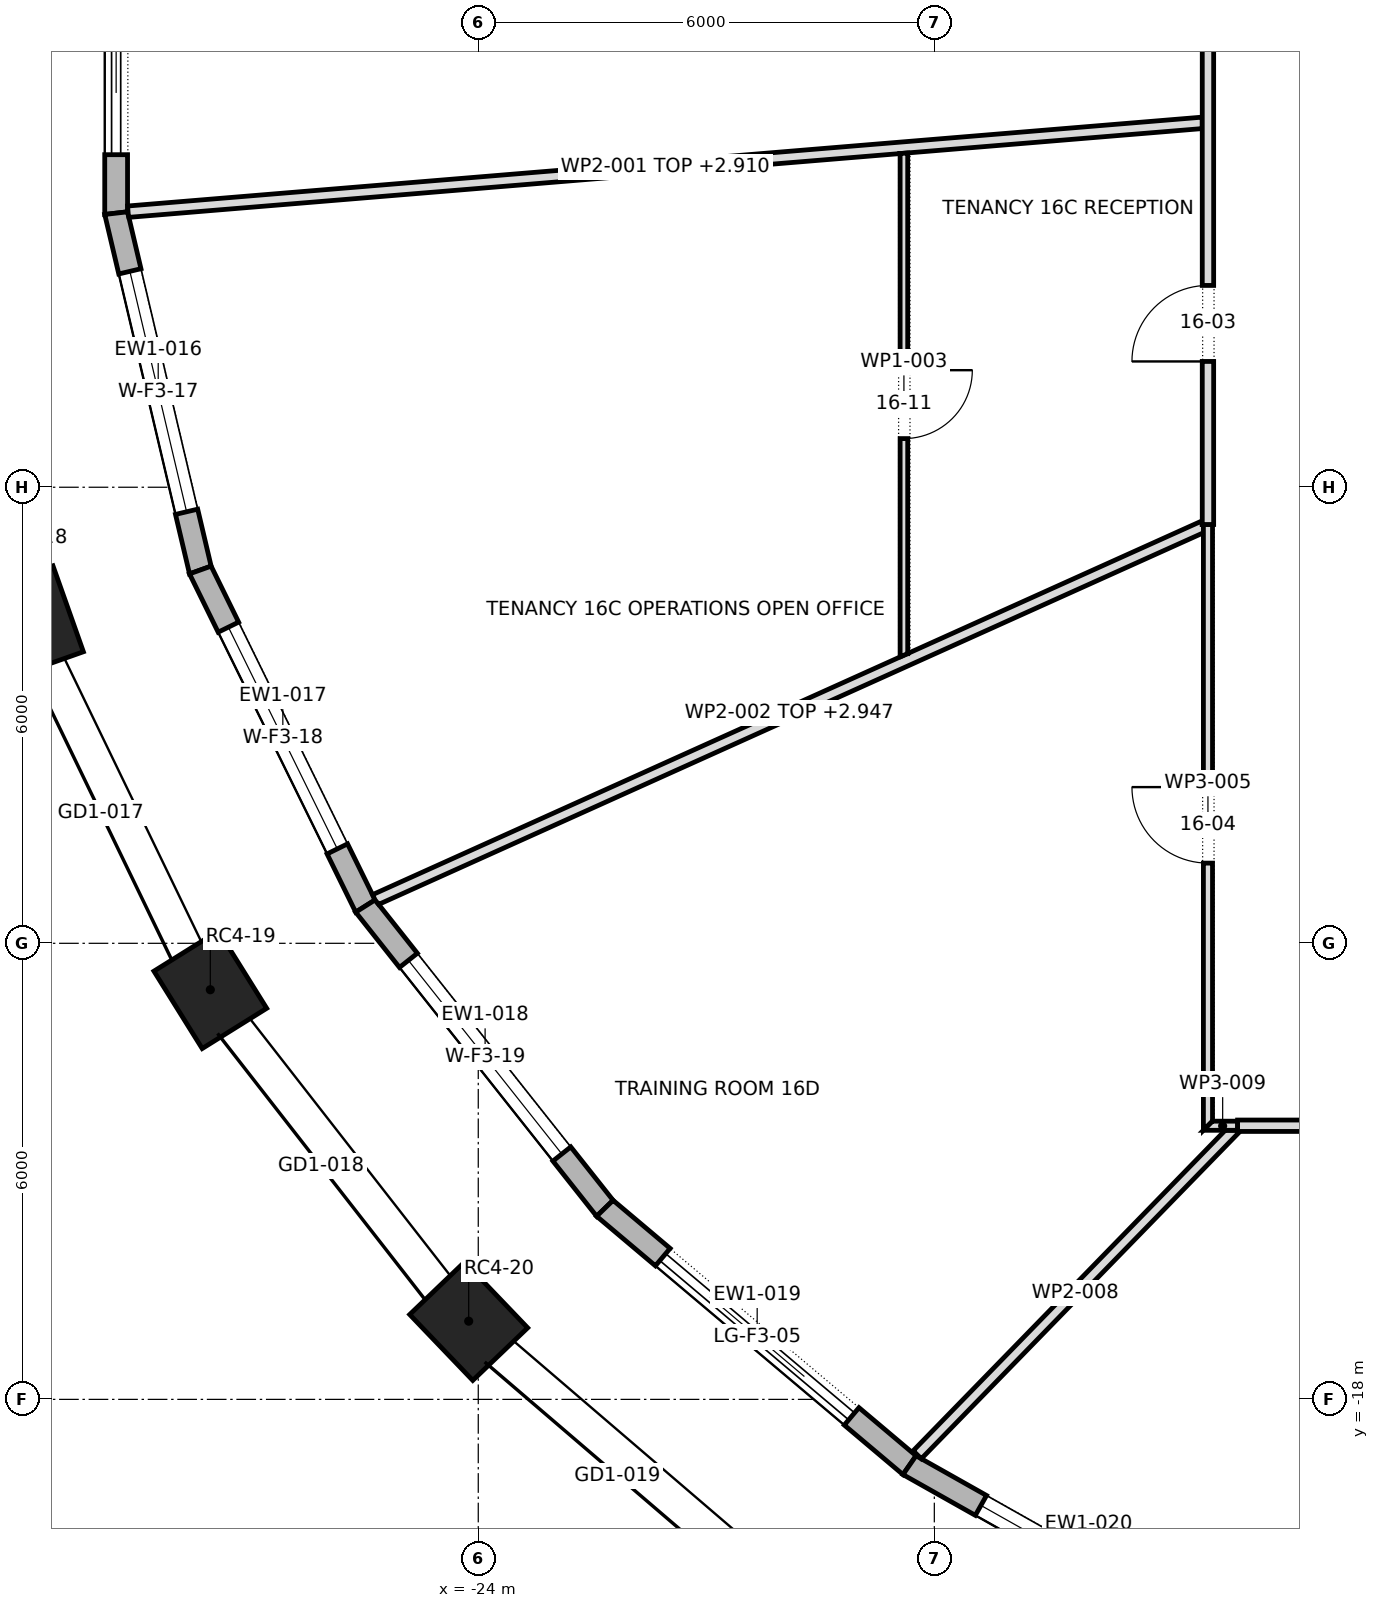
"""IFC4 building model, lengths in metres.
Left out: names, types, materials, properties, quantities, classifications, styles, units other than length and angle.
Written with IfcOpenShell. Run it as: python <this file> out.ifc"""

import sys

from ifc_helpers import new_model, si_unit, direction, frame, frame_2d, origin, origin_2d, place, context, subcontext, project, spatial, polyline, rectangle, outline, extrude, element, fill, save


model = new_model("IFC4")
c1 = context("Model", 3, precision=1e-05, world=origin(), true_north=direction((0.0, 1.0)))
c2 = subcontext(c1, "Body", "Model", "MODEL_VIEW")
j1 = project(units=[si_unit("LENGTHUNIT", "METRE"), si_unit("PLANEANGLEUNIT", "RADIAN")], contexts=[c1])
p1 = place(None, origin())
s1 = spatial("IfcSite", under=j1, at=p1, CompositionType="ELEMENT")
p2 = place(p1, origin())
s2 = spatial("IfcBuilding", under=s1, at=p2, CompositionType="ELEMENT")
p3 = place(p2, frame((0.0, 0.0, 234.9)))
s3 = spatial("IfcBuildingStorey", under=s2, at=p3, CompositionType="ELEMENT", Elevation=234.9)
for number, where, z_axis, x_axis in (
    (1, (-29.867, -7.766, 0.0), (0.0, 0.0, 1.0), (0.334, -0.943, 0.0)),
    (2, (-27.525, -12.611, 0.0), (0.0, 0.0, 1.0), (0.529, -0.849, 0.0)),
    (3, (-24.126, -16.971, 0.0), (0.0, 0.0, 1.0), (0.692, -0.722, 0.0)),
):
    element("IfcColumn", number, at=place(p3, frame(where, z_axis=z_axis, x_axis=x_axis)), inside=s3, PredefinedType="COLUMN", context=c2, shape_type="SweptSolid", body=[
        extrude(rectangle(XDim=1.2, YDim=1.0, at=origin_2d()), origin(), (0.0, 0.0, 1.0), 4.0),
    ])
p4 = place(p3, frame((-28.764, 2.394, 0.0), z_axis=(0.0, 0.0, 1.0), x_axis=(0.0, -1.0, 0.0)))
e4 = element("IfcWall", 4, at=p4, inside=s3, PredefinedType="STANDARD", context=c2, shape_type="SweptSolid", body=[
    extrude(outline(polyline([(-0.017, -0.15), (4.805, -0.15), (4.77, 0.15), (0.017, 0.15), (-0.017, -0.15)])), origin(), (0.0, 0.0, 1.0), 3.7),
])
p5 = place(p4, frame((0.769, 0.0, 0.0)))
e5 = element("IfcOpeningElement", 5, at=p5, cuts=e4, PredefinedType="OPENING", context=c2, shape_type="SweptSolid", body=[
    extrude(rectangle(XDim=3.25, YDim=3.25, at=frame_2d((1.625, 1.625))), frame((0.0, 0.162, 0.0), z_axis=(0.0, -1.0, 0.0), x_axis=(1.0, 0.0, 0.0)), (0.0, 0.0, 1.0), 0.324),
])
p6 = place(p3, frame((-28.764, -2.394, 0.0), z_axis=(0.0, 0.0, 1.0), x_axis=(0.229617574796, -0.97328093033, 0.0)))
e6 = element("IfcWall", 6, at=p6, inside=s3, PredefinedType="STANDARD", context=c2, shape_type="SweptSolid", body=[
    extrude(outline(polyline([(-0.017, -0.15), (4.841, -0.15), (4.807, 0.15), (0.017, 0.15), (-0.017, -0.15)])), origin(), (0.0, 0.0, 1.0), 3.7),
])
p7 = place(p6, frame((0.787, 0.0, 0.6)))
e7 = element("IfcOpeningElement", 7, at=p7, cuts=e6, PredefinedType="OPENING", context=c2, shape_type="SweptSolid", body=[
    extrude(rectangle(XDim=3.25, YDim=2.65, at=frame_2d((1.625, 1.325))), frame((0.0, 0.162, 0.0), z_axis=(0.0, -1.0, 0.0), x_axis=(1.0, 0.0, 0.0)), (0.0, 0.0, 1.0), 0.324),
])
p8 = place(p3, frame((-27.656, -7.089, 0.0), z_axis=(0.0, 0.0, 1.0), x_axis=(0.440857641837, -0.897577038272, 0.0)))
e8 = element("IfcWall", 8, at=p8, inside=s3, PredefinedType="STANDARD", context=c2, shape_type="SweptSolid", body=[
    extrude(outline(polyline([(-0.017, -0.15), (4.941, -0.15), (4.909, 0.15), (0.017, 0.15), (-0.017, -0.15)])), origin(), (0.0, 0.0, 1.0), 3.7),
])
p9 = place(p8, frame((0.838, 0.0, 0.6)))
e9 = element("IfcOpeningElement", 9, at=p9, cuts=e8, PredefinedType="OPENING", context=c2, shape_type="SweptSolid", body=[
    extrude(rectangle(XDim=3.25, YDim=2.65, at=frame_2d((1.625, 1.325))), frame((0.0, 0.162, 0.0), z_axis=(0.0, -1.0, 0.0), x_axis=(1.0, 0.0, 0.0)), (0.0, 0.0, 1.0), 0.324),
])
p10 = place(p3, frame((-25.485, -11.51, 0.0), z_axis=(0.0, 0.0, 1.0), x_axis=(0.621084984443, -0.783743224596, 0.0)))
e10 = element("IfcWall", 10, at=p10, inside=s3, PredefinedType="STANDARD", context=c2, shape_type="SweptSolid", body=[
    extrude(outline(polyline([(-0.016, -0.15), (5.088, -0.15), (5.058, 0.15), (0.016, 0.15), (-0.016, -0.15)])), origin(), (0.0, 0.0, 1.0), 3.7),
])
p11 = place(p10, frame((0.912, 0.0, 0.6)))
e11 = element("IfcOpeningElement", 11, at=p11, cuts=e10, PredefinedType="OPENING", context=c2, shape_type="SweptSolid", body=[
    extrude(rectangle(XDim=3.25, YDim=2.65, at=frame_2d((1.625, 1.325))), frame((0.0, 0.162, 0.0), z_axis=(0.0, -1.0, 0.0), x_axis=(1.0, 0.0, 0.0)), (0.0, 0.0, 1.0), 0.324),
])
p12 = place(p3, frame((-22.334, -15.486, 0.0), z_axis=(0.0, 0.0, 1.0), x_axis=(0.764475071601, -0.644653290459, 0.0)))
e12 = element("IfcWall", 12, at=p12, inside=s3, PredefinedType="STANDARD", context=c2, shape_type="SweptSolid", body=[
    extrude(outline(polyline([(-0.015, -0.15), (5.257, -0.15), (5.229, 0.15), (0.015, 0.15), (-0.015, -0.15)])), origin(), (0.0, 0.0, 1.0), 3.7),
])
p13 = place(p12, frame((0.996, 0.0, 0.0)))
e13 = element("IfcOpeningElement", 13, at=p13, cuts=e12, PredefinedType="OPENING", context=c2, shape_type="SweptSolid", body=[
    extrude(rectangle(XDim=3.25, YDim=3.25, at=frame_2d((1.625, 1.625))), frame((0.0, 0.162, 0.0), z_axis=(0.0, -1.0, 0.0), x_axis=(1.0, 0.0, 0.0)), (0.0, 0.0, 1.0), 0.324),
])
p14 = place(p3, frame((-18.326, -18.865, 0.0), z_axis=(0.0, 0.0, 1.0), x_axis=(0.871225596594, -0.490882837181, 0.0)))
e14 = element("IfcWall", 14, at=p14, inside=s3, PredefinedType="STANDARD", context=c2, shape_type="SweptSolid", body=[
    extrude(outline(polyline([(-0.014, -0.15), (5.42, -0.15), (5.393, 0.15), (0.014, 0.15), (-0.014, -0.15)])), origin(), (0.0, 0.0, 1.0), 3.7),
])
p15 = place(p14, frame((1.078, 0.0, 0.6)))
e15 = element("IfcOpeningElement", 15, at=p15, cuts=e14, PredefinedType="OPENING", context=c2, shape_type="SweptSolid", body=[
    extrude(rectangle(XDim=3.25, YDim=2.65, at=frame_2d((1.625, 1.325))), frame((0.0, 0.162, 0.0), z_axis=(0.0, -1.0, 0.0), x_axis=(1.0, 0.0, 0.0)), (0.0, 0.0, 1.0), 0.324),
])
p16 = place(p3, frame((-28.608, -2.375, 0.0), z_axis=(0.0, 0.0, 1.0), x_axis=(0.996598135394, 0.082414540768, 0.0)))
e16 = element("IfcWall", 16, at=p16, inside=s3, PredefinedType="PARTITIONING", context=c2, shape_type="SweptSolid", body=[
    extrude(outline(polyline([(0.005, -0.075), (1.701, -0.075), (3.398, -0.075), (5.095, -0.075), (6.792, -0.075), (8.489, -0.075), (10.186, -0.075), (10.186, -0.075), (10.189, -0.075), (12.182, -0.075), (14.175, -0.075), (14.187, 0.071), (14.187, 0.075), (12.413, 0.075), (10.64, 0.075), (8.867, 0.075), (7.093, 0.075), (5.32, 0.075), (3.547, 0.075), (1.773, 0.075), (0.0, 0.075), (0.0, -0.044), (0.005, -0.075)])), origin(), (0.0, 0.0, 1.0), 2.91),
])
p17 = place(p3, frame((-25.36, -11.428, 0.0), z_axis=(0.0, 0.0, 1.0), x_axis=(0.911719171836, 0.410814011089, 0.0)))
e17 = element("IfcWall", 17, at=p17, inside=s3, PredefinedType="PARTITIONING", context=c2, shape_type="SweptSolid", body=[
    extrude(outline(polyline([(0.021, -0.075), (2.004, -0.075), (3.988, -0.075), (5.971, -0.075), (7.955, -0.075), (9.938, -0.075), (11.922, -0.075), (11.967, 0.025), (11.953, 0.031), (11.972, 0.074), (11.972, 0.075), (10.556, 0.075), (9.139, 0.075), (7.723, 0.075), (7.722, 0.073), (7.717, 0.075), (5.788, 0.075), (3.858, 0.075), (1.929, 0.075), (0.0, 0.075), (0.0, 0.063), (0.002, -0.002), (0.021, -0.075)])), origin(), (0.0, 0.0, 1.0), 2.947),
])
p18 = place(p3, frame((-18.4, -8.232, 0.0), z_axis=(0.0, 0.0, 1.0), x_axis=(0.0, 1.0, 0.0)))
e18 = element("IfcWall", 18, at=p18, inside=s3, PredefinedType="PARTITIONING", context=c2, shape_type="SweptSolid", body=[
    extrude(outline(polyline([(6.63, -0.05), (6.63, -0.048), (6.622, 0.05), (4.967, 0.05), (3.311, 0.05), (1.656, 0.05), (0.0, 0.05), (0.0, 0.05), (0.045, -0.05), (1.691, -0.05), (3.338, -0.05), (4.984, -0.05), (6.63, -0.05)])), origin(), (0.0, 0.0, 1.0), 3.7),
])
p19 = place(p18, frame((2.873, 0.0, 0.0)))
e19 = element("IfcOpeningElement", 19, at=p19, cuts=e18, PredefinedType="OPENING", context=c2, shape_type="SweptSolid", body=[
    extrude(rectangle(XDim=0.9, YDim=2.1, at=frame_2d((0.45, 1.05))), frame((0.0, 0.062, 0.0), z_axis=(0.0, -1.0, 0.0), x_axis=(1.0, 0.0, 0.0)), (0.0, 0.0, 1.0), 0.124),
])
p20 = place(p3, frame((-14.4, -14.46, 0.0), z_axis=(0.0, 0.0, 1.0), x_axis=(0.0, 1.0, 0.0)))
e20 = element("IfcWall", 20, at=p20, inside=s3, PredefinedType="PARTITIONING", context=c2, shape_type="SweptSolid", body=[
    extrude(outline(polyline([(7.97, 0.06), (5.978, 0.06), (3.985, 0.06), (1.992, 0.06), (0.0, 0.06), (0.12, -0.06), (2.083, -0.06), (4.045, -0.06), (6.008, -0.06), (7.97, -0.06), (7.97, 0.06)])), origin(), (0.0, 0.0, 1.0), 3.7),
])
p21 = place(p20, frame((3.515, 0.0, 0.0)))
e21 = element("IfcOpeningElement", 21, at=p21, cuts=e20, PredefinedType="OPENING", context=c2, shape_type="SweptSolid", body=[
    extrude(rectangle(XDim=1.0, YDim=2.1, at=frame_2d((0.5, 1.05))), frame((0.0, 0.072, 0.0), z_axis=(0.0, -1.0, 0.0), x_axis=(1.0, 0.0, 0.0)), (0.0, 0.0, 1.0), 0.144),
])
p22 = place(p3, frame((-14.4, -6.49, 0.0), z_axis=(0.0, 0.0, 1.0), x_axis=(0.0, 1.0, 0.0)))
e22 = element("IfcWall", 22, at=p22, inside=s3, PredefinedType="PARTITIONING", context=c2, shape_type="SweptSolid", body=[
    extrude(outline(polyline([(16.499, -0.075), (16.499, -0.075), (16.421, 0.075), (14.596, 0.075), (12.772, 0.075), (10.947, 0.075), (9.123, 0.075), (7.298, 0.075), (5.474, 0.075), (3.649, 0.075), (1.824, 0.075), (0.0, 0.075), (0.0, -0.075), (1.833, -0.075), (3.667, -0.075), (5.5, -0.075), (7.333, -0.075), (9.166, -0.075), (11.0, -0.075), (12.833, -0.075), (14.666, -0.075), (16.499, -0.075)])), origin(), (0.0, 0.0, 1.0), 3.7),
])
p23 = place(p22, frame((9.975, 0.0, 0.0)))
e23 = element("IfcOpeningElement", 23, at=p23, cuts=e22, PredefinedType="OPENING", context=c2, shape_type="SweptSolid", body=[
    extrude(rectangle(XDim=1.8, YDim=2.1, at=frame_2d((0.9, 1.05))), frame((0.0, 0.087, 0.0), z_axis=(0.0, -1.0, 0.0), x_axis=(1.0, 0.0, 0.0)), (0.0, 0.0, 1.0), 0.174),
])
p24 = place(p22, frame((2.145, 0.0, 0.0)))
e24 = element("IfcOpeningElement", 24, at=p24, cuts=e22, PredefinedType="OPENING", context=c2, shape_type="SweptSolid", body=[
    extrude(rectangle(XDim=1.0, YDim=2.1, at=frame_2d((0.5, 1.05))), frame((0.0, 0.087, 0.0), z_axis=(0.0, -1.0, 0.0), x_axis=(1.0, 0.0, 0.0)), (0.0, 0.0, 1.0), 0.174),
])
p25 = place(p3, frame((-14.032, -14.423, 0.0), z_axis=(0.0, 0.0, 1.0), x_axis=(-0.697618878337, -0.716469050684, 0.0)))
e25 = element("IfcWall", 25, at=p25, inside=s3, PredefinedType="PARTITIONING", context=c2, shape_type="SweptSolid", body=[
    extrude(outline(polyline([(0.0, 0.075), (0.0, 0.075), (0.022, 0.052), (0.011, 0.042), (0.125, -0.075), (2.086, -0.075), (4.048, -0.075), (6.01, -0.075), (6.01, 0.075), (4.507, 0.075), (3.005, 0.075), (1.502, 0.075), (0.0, 0.075)])), origin(), (0.0, 0.0, 1.0), 3.7),
])
p26 = place(p3, frame((-14.01, -14.4, 0.0), z_axis=(0.0, 0.0, 1.0), x_axis=(-1.0, 0.0, 0.0)))
e26 = element("IfcWall", 26, at=p26, inside=s3, PredefinedType="PARTITIONING", context=c2, shape_type="SweptSolid", body=[
    extrude(outline(polyline([(0.0, -0.06), (0.33, -0.06), (0.45, 0.06), (0.0, 0.06), (0.0, -0.06)])), origin(), (0.0, 0.0, 1.0), 3.7),
])
p27 = place(p3, frame((-1.596, -14.4, 0.0), z_axis=(0.0, 0.0, 1.0), x_axis=(-1.0, 0.0, 0.0)))
e27 = element("IfcWall", 27, at=p27, inside=s3, PredefinedType="PARTITIONING", context=c2, shape_type="SweptSolid", body=[
    extrude(outline(polyline([(12.414, 0.075), (10.665, 0.075), (8.916, 0.075), (7.166, 0.075), (5.417, 0.075), (3.667, 0.075), (1.918, 0.075), (0.168, 0.075), (0.0, -0.075), (0.0, -0.075), (1.773, -0.075), (3.547, -0.075), (5.32, -0.075), (7.094, -0.075), (8.867, -0.075), (10.641, -0.075), (12.414, -0.075), (12.414, 0.075)])), origin(), (0.0, 0.0, 1.0), 3.7),
])
p28 = place(p27, frame((5.749, 0.0, 0.0)))
e28 = element("IfcOpeningElement", 28, at=p28, cuts=e27, PredefinedType="OPENING", context=c2, shape_type="SweptSolid", body=[
    extrude(rectangle(XDim=1.0, YDim=2.1, at=frame_2d((0.5, 1.05))), frame((0.0, 0.087, 0.0), z_axis=(0.0, -1.0, 0.0), x_axis=(1.0, 0.0, 0.0)), (0.0, 0.0, 1.0), 0.174),
])
p29 = place(p5, origin())
e29 = element("IfcDoor", 29, at=p29, inside=s3, OperationType="DOUBLE_DOOR_SLIDING", PredefinedType="DOOR", context=c2, shape_type="SweptSolid", body=[
    extrude(rectangle(XDim=3.25, YDim=3.25, at=frame_2d((1.625, 1.625))), frame((0.0, 0.025, 0.0), z_axis=(0.0, -1.0, 0.0), x_axis=(1.0, 0.0, 0.0)), (0.0, 0.0, 1.0), 0.05),
])
fill(e5, e29)
p30 = place(p7, origin())
e30 = element("IfcWindow", 30, at=p30, inside=s3, PartitioningType="TRIPLE_PANEL_VERTICAL", PredefinedType="WINDOW", context=c2, shape_type="SweptSolid", body=[
    extrude(rectangle(XDim=3.25, YDim=2.65, at=frame_2d((1.625, 1.325))), frame((0.0, 0.03, 0.0), z_axis=(0.0, -1.0, 0.0), x_axis=(1.0, 0.0, 0.0)), (0.0, 0.0, 1.0), 0.06),
])
fill(e7, e30)
p31 = place(p9, origin())
e31 = element("IfcWindow", 31, at=p31, inside=s3, PartitioningType="TRIPLE_PANEL_VERTICAL", PredefinedType="WINDOW", context=c2, shape_type="SweptSolid", body=[
    extrude(rectangle(XDim=3.25, YDim=2.65, at=frame_2d((1.625, 1.325))), frame((0.0, 0.03, 0.0), z_axis=(0.0, -1.0, 0.0), x_axis=(1.0, 0.0, 0.0)), (0.0, 0.0, 1.0), 0.06),
])
fill(e9, e31)
p32 = place(p11, origin())
e32 = element("IfcWindow", 32, at=p32, inside=s3, PartitioningType="TRIPLE_PANEL_VERTICAL", PredefinedType="WINDOW", context=c2, shape_type="SweptSolid", body=[
    extrude(rectangle(XDim=3.25, YDim=2.65, at=frame_2d((1.625, 1.325))), frame((0.0, 0.03, 0.0), z_axis=(0.0, -1.0, 0.0), x_axis=(1.0, 0.0, 0.0)), (0.0, 0.0, 1.0), 0.06),
])
fill(e11, e32)
p33 = place(p13, origin())
e33 = element("IfcDoor", 33, at=p33, inside=s3, OperationType="DOUBLE_DOOR_SLIDING", PredefinedType="DOOR", context=c2, shape_type="SweptSolid", body=[
    extrude(rectangle(XDim=3.25, YDim=3.25, at=frame_2d((1.625, 1.625))), frame((0.0, 0.025, 0.0), z_axis=(0.0, -1.0, 0.0), x_axis=(1.0, 0.0, 0.0)), (0.0, 0.0, 1.0), 0.05),
])
fill(e13, e33)
p34 = place(p15, origin())
e34 = element("IfcWindow", 34, at=p34, inside=s3, PartitioningType="TRIPLE_PANEL_VERTICAL", PredefinedType="WINDOW", context=c2, shape_type="SweptSolid", body=[
    extrude(rectangle(XDim=3.25, YDim=2.65, at=frame_2d((1.625, 1.325))), frame((0.0, 0.03, 0.0), z_axis=(0.0, -1.0, 0.0), x_axis=(1.0, 0.0, 0.0)), (0.0, 0.0, 1.0), 0.06),
])
fill(e15, e34)
p35 = place(p24, origin())
e35 = element("IfcDoor", 35, at=p35, inside=s3, OperationType="SINGLE_SWING_RIGHT", PredefinedType="DOOR", context=c2, shape_type="SweptSolid", body=[
    extrude(rectangle(XDim=1.0, YDim=2.1, at=frame_2d((0.5, 1.05))), frame((0.0, 0.025, 0.0), z_axis=(0.0, -1.0, 0.0), x_axis=(1.0, 0.0, 0.0)), (0.0, 0.0, 1.0), 0.05),
])
fill(e24, e35)
p36 = place(p21, origin())
e36 = element("IfcDoor", 36, at=p36, inside=s3, OperationType="SINGLE_SWING_LEFT", PredefinedType="DOOR", context=c2, shape_type="SweptSolid", body=[
    extrude(rectangle(XDim=1.0, YDim=2.1, at=frame_2d((0.5, 1.05))), frame((0.0, 0.025, 0.0), z_axis=(0.0, -1.0, 0.0), x_axis=(1.0, 0.0, 0.0)), (0.0, 0.0, 1.0), 0.05),
])
fill(e21, e36)
p37 = place(p19, frame((0.9, 0.0, 0.0), z_axis=(0.0, 0.0, 1.0), x_axis=(-1.0, 0.0, 0.0)))
e37 = element("IfcDoor", 37, at=p37, inside=s3, OperationType="SINGLE_SWING_RIGHT", PredefinedType="DOOR", context=c2, shape_type="SweptSolid", body=[
    extrude(rectangle(XDim=0.9, YDim=2.1, at=frame_2d((0.45, 1.05))), frame((0.0, 0.025, 0.0), z_axis=(0.0, -1.0, 0.0), x_axis=(1.0, 0.0, 0.0)), (0.0, 0.0, 1.0), 0.05),
])
fill(e19, e37)
save(model, sys.argv[1])
